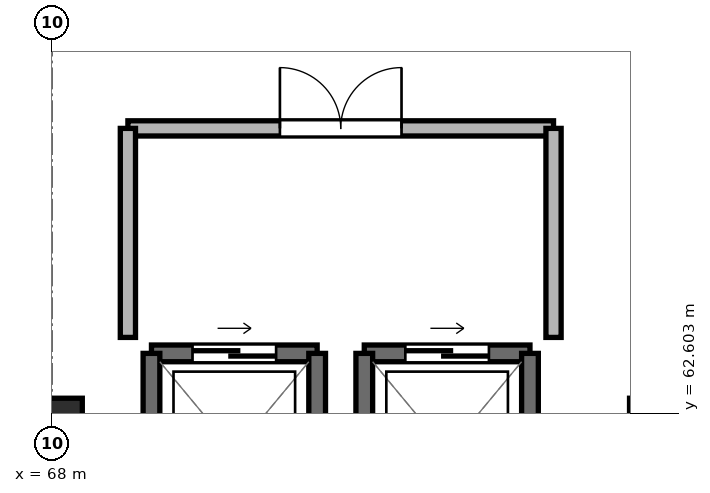
"""IFC4 building model, lengths in metres.
Left out: names, types, materials, properties, quantities, classifications, styles, units other than length and angle.
Written with IfcOpenShell. Run it as: python <this file> out.ifc"""

import sys

from ifc_helpers import new_model, si_unit, direction, frame, frame_2d, origin, origin_2d, place, context, subcontext, project, spatial, rectangle, extrude, element, fill, save


model = new_model("IFC4")
c1 = context("Model", 3, precision=1e-05, world=origin(), true_north=direction((0.0, 1.0)))
c2 = subcontext(c1, "Body", "Model", "MODEL_VIEW")
j1 = project(units=[si_unit("LENGTHUNIT", "METRE"), si_unit("PLANEANGLEUNIT", "RADIAN")], contexts=[c1])
p1 = place(None, origin())
s1 = spatial("IfcSite", under=j1, at=p1, CompositionType="ELEMENT")
p2 = place(p1, origin())
s2 = spatial("IfcBuilding", under=s1, at=p2, CompositionType="ELEMENT")
p3 = place(p2, frame((0.0, 0.0, 37.3)))
s3 = spatial("IfcBuildingStorey", under=s2, at=p3, CompositionType="ELEMENT", Elevation=37.3)
for number, where, z_axis, x_axis in (
    (1, (68.0, 62.4, -0.25), (0.0, 0.0, 1.0), (1.0, 0.0, 0.0)),
    (2, (76.0, 62.4, -0.25), (0.0, 0.0, 1.0), (1.0, 0.0, 0.0)),
):
    element("IfcColumn", number, at=place(p3, frame(where, z_axis=z_axis, x_axis=x_axis)), inside=s3, PredefinedType="COLUMN", context=c2, shape_type="SweptSolid", body=[
        extrude(rectangle(XDim=0.8, YDim=0.8, at=origin_2d()), origin(), (0.0, 0.0, 1.0), 3.26),
    ])
p4 = place(p3, frame((71.49, 63.39, 0.0), z_axis=(0.0, 0.0, 1.0), x_axis=(-1.0, 0.0, 0.0)))
e3 = element("IfcWall", 3, at=p4, inside=s3, PredefinedType="SHEAR", context=c2, shape_type="SweptSolid", body=[
    extrude(rectangle(XDim=2.18, YDim=0.22, at=frame_2d((1.09, 0.0))), origin(), (0.0, 0.0, 1.0), 3.01),
])
p5 = place(p4, frame((0.54, 0.0, 0.0)))
e4 = element("IfcOpeningElement", 4, at=p5, cuts=e3, PredefinedType="OPENING", context=c2, shape_type="SweptSolid", body=[
    extrude(rectangle(XDim=1.1, YDim=2.2, at=frame_2d((0.55, 1.1))), frame((0.0, 0.122, 0.0), z_axis=(0.0, -1.0, 0.0), x_axis=(1.0, 0.0, 0.0)), (0.0, 0.0, 1.0), 0.244),
])
for number, where, z_axis, x_axis in (
    (5, (69.31, 63.39, 0.0), (0.0, 0.0, 1.0), (0.0, -1.0, 0.0)),
    (6, (71.49, 60.81, 0.0), (0.0, 0.0, 1.0), (0.0, 1.0, 0.0)),
):
    element("IfcWall", number, at=place(p3, frame(where, z_axis=z_axis, x_axis=x_axis)), inside=s3, PredefinedType="SHEAR", context=c2, shape_type="SweptSolid", body=[
        extrude(rectangle(XDim=2.58, YDim=0.22, at=frame_2d((1.29, 0.0))), origin(), (0.0, 0.0, 1.0), 3.01),
    ])
p6 = place(p3, frame((74.29, 63.39, 0.0), z_axis=(0.0, 0.0, 1.0), x_axis=(-1.0, 0.0, 0.0)))
e7 = element("IfcWall", 7, at=p6, inside=s3, PredefinedType="SHEAR", context=c2, shape_type="SweptSolid", body=[
    extrude(rectangle(XDim=2.18, YDim=0.22, at=frame_2d((1.09, 0.0))), origin(), (0.0, 0.0, 1.0), 3.01),
])
p7 = place(p6, frame((0.54, 0.0, 0.0)))
e8 = element("IfcOpeningElement", 8, at=p7, cuts=e7, PredefinedType="OPENING", context=c2, shape_type="SweptSolid", body=[
    extrude(rectangle(XDim=1.1, YDim=2.2, at=frame_2d((0.55, 1.1))), frame((0.0, 0.122, 0.0), z_axis=(0.0, -1.0, 0.0), x_axis=(1.0, 0.0, 0.0)), (0.0, 0.0, 1.0), 0.244),
])
for number, where, z_axis, x_axis in (
    (9, (72.11, 63.39, 0.0), (0.0, 0.0, 1.0), (0.0, -1.0, 0.0)),
    (10, (74.29, 60.81, 0.0), (0.0, 0.0, 1.0), (0.0, 1.0, 0.0)),
):
    element("IfcWall", number, at=place(p3, frame(where, z_axis=z_axis, x_axis=x_axis)), inside=s3, PredefinedType="SHEAR", context=c2, shape_type="SweptSolid", body=[
        extrude(rectangle(XDim=2.58, YDim=0.22, at=frame_2d((1.29, 0.0))), origin(), (0.0, 0.0, 1.0), 3.01),
    ])
p8 = place(p3, frame((69.0, 66.35, 0.0), z_axis=(0.0, 0.0, 1.0), x_axis=(1.0, 0.0, 0.0)))
e11 = element("IfcWall", 11, at=p8, inside=s3, PredefinedType="PARTITIONING", context=c2, shape_type="SweptSolid", body=[
    extrude(rectangle(XDim=5.6, YDim=0.2, at=frame_2d((2.8, 0.0))), origin(), (0.0, 0.0, 1.0), 2.53),
])
p9 = place(p8, frame((2.0, 0.0, 0.0)))
e12 = element("IfcOpeningElement", 12, at=p9, cuts=e11, PredefinedType="OPENING", context=c2, shape_type="SweptSolid", body=[
    extrude(rectangle(XDim=1.6, YDim=2.2, at=frame_2d((0.8, 1.1))), frame((0.0, 0.112, 0.0), z_axis=(0.0, -1.0, 0.0), x_axis=(1.0, 0.0, 0.0)), (0.0, 0.0, 1.0), 0.224),
])
for number, where, z_axis, x_axis in (
    (13, (69.0, 63.6, 0.0), (0.0, 0.0, 1.0), (0.0, 1.0, 0.0)),
    (14, (74.6, 63.6, 0.0), (0.0, 0.0, 1.0), (0.0, 1.0, 0.0)),
):
    element("IfcWall", number, at=place(p3, frame(where, z_axis=z_axis, x_axis=x_axis)), inside=s3, PredefinedType="PARTITIONING", context=c2, shape_type="SweptSolid", body=[
        extrude(rectangle(XDim=2.75, YDim=0.2, at=frame_2d((1.375, 0.0))), origin(), (0.0, 0.0, 1.0), 2.53),
    ])
p10 = place(p5, origin())
e15 = element("IfcDoor", 15, at=p10, inside=s3, OperationType="SLIDING_TO_LEFT", PredefinedType="DOOR", context=c2, shape_type="SweptSolid", body=[
    extrude(rectangle(XDim=1.1, YDim=2.2, at=frame_2d((0.55, 1.1))), frame((0.0, 0.025, 0.0), z_axis=(0.0, -1.0, 0.0), x_axis=(1.0, 0.0, 0.0)), (0.0, 0.0, 1.0), 0.05),
])
fill(e4, e15)
p11 = place(p7, origin())
e16 = element("IfcDoor", 16, at=p11, inside=s3, OperationType="SLIDING_TO_LEFT", PredefinedType="DOOR", context=c2, shape_type="SweptSolid", body=[
    extrude(rectangle(XDim=1.1, YDim=2.2, at=frame_2d((0.55, 1.1))), frame((0.0, 0.025, 0.0), z_axis=(0.0, -1.0, 0.0), x_axis=(1.0, 0.0, 0.0)), (0.0, 0.0, 1.0), 0.05),
])
fill(e8, e16)
p12 = place(p9, origin())
e17 = element("IfcDoor", 17, at=p12, inside=s3, OperationType="DOUBLE_DOOR_SINGLE_SWING", PredefinedType="DOOR", context=c2, shape_type="SweptSolid", body=[
    extrude(rectangle(XDim=1.6, YDim=2.2, at=frame_2d((0.8, 1.1))), frame((0.0, 0.025, 0.0), z_axis=(0.0, -1.0, 0.0), x_axis=(1.0, 0.0, 0.0)), (0.0, 0.0, 1.0), 0.05),
])
fill(e12, e17)
save(model, sys.argv[1])
